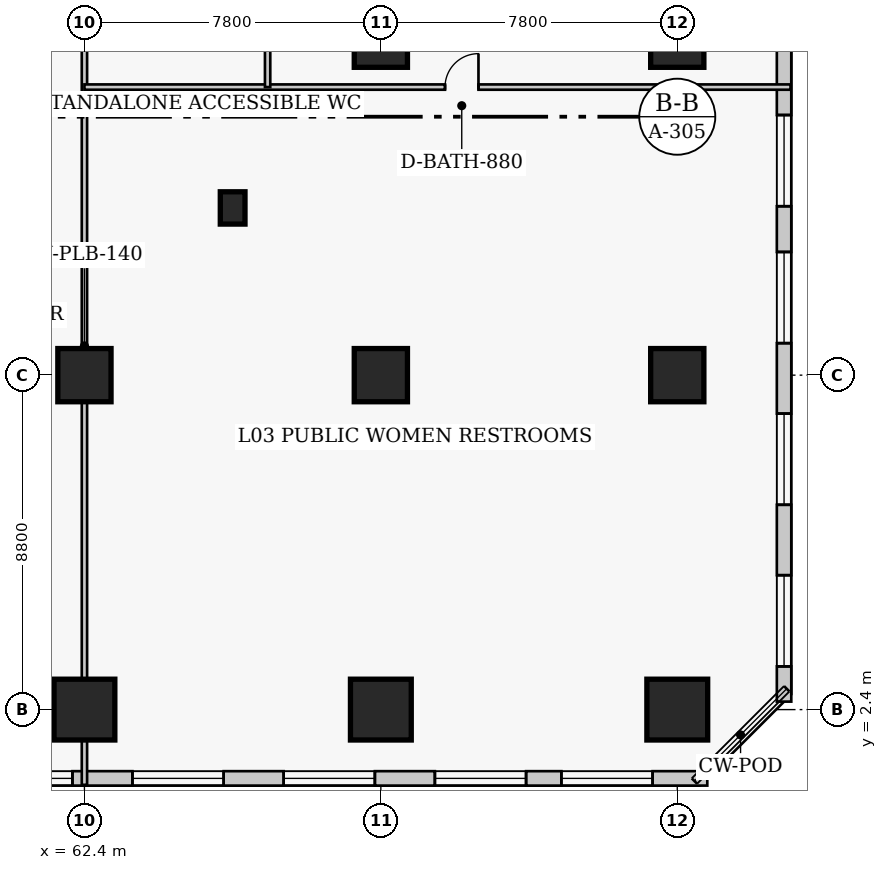
"""IFC4 building model, lengths in metres.
Left out: names, types, materials, properties, quantities, classifications, styles, units other than length and angle.
Written with IfcOpenShell. Run it as: python <this file> out.ifc"""

import sys

from ifc_helpers import new_model, si_unit, direction, frame, frame_2d, origin, origin_2d, place, context, subcontext, project, spatial, rectangle, extrude, element, fill, save


model = new_model("IFC4")
c1 = context("Model", 3, precision=1e-05, world=origin(), true_north=direction((0.0, 1.0)))
c2 = subcontext(c1, "Body", "Model", "MODEL_VIEW")
j1 = project(units=[si_unit("LENGTHUNIT", "METRE"), si_unit("PLANEANGLEUNIT", "RADIAN")], contexts=[c1])
p1 = place(None, origin())
s1 = spatial("IfcSite", under=j1, at=p1, CompositionType="ELEMENT")
p2 = place(p1, origin())
s2 = spatial("IfcBuilding", under=s1, at=p2, CompositionType="ELEMENT")
p3 = place(p2, frame((0.0, 0.0, 15.8)))
s3 = spatial("IfcBuildingStorey", under=s2, at=p3, CompositionType="ELEMENT", Elevation=15.8)
p4 = place(p3, frame((62.4, 2.4, 0.0), z_axis=(0.0, 0.0, 1.0), x_axis=(1.0, 0.0, 0.0)))
e1 = element("IfcColumn", 1, at=p4, inside=s3, PredefinedType="COLUMN", context=c2, shape_type="SweptSolid", body=[
    extrude(rectangle(XDim=1.6, YDim=1.6, at=origin_2d()), origin(), (0.0, 0.0, 1.0), 5.0),
])
p5 = place(p3, frame((62.4, 11.2, 0.0), z_axis=(0.0, 0.0, 1.0), x_axis=(1.0, 0.0, 0.0)))
e2 = element("IfcColumn", 2, at=p5, inside=s3, PredefinedType="COLUMN", context=c2, shape_type="SweptSolid", body=[
    extrude(rectangle(XDim=1.4, YDim=1.4, at=origin_2d()), origin(), (0.0, 0.0, 1.0), 5.0),
])
p6 = place(p3, frame((70.2, 2.4, 0.0), z_axis=(0.0, 0.0, 1.0), x_axis=(1.0, 0.0, 0.0)))
e3 = element("IfcColumn", 3, at=p6, inside=s3, PredefinedType="COLUMN", context=c2, shape_type="SweptSolid", body=[
    extrude(rectangle(XDim=1.6, YDim=1.6, at=origin_2d()), origin(), (0.0, 0.0, 1.0), 5.0),
])
for number, where, z_axis, x_axis in (
    (4, (70.2, 11.2, 0.0), (0.0, 0.0, 1.0), (1.0, 0.0, 0.0)),
    (5, (70.2, 20.0, 0.0), (0.0, 0.0, 1.0), (1.0, 0.0, 0.0)),
):
    element("IfcColumn", number, at=place(p3, frame(where, z_axis=z_axis, x_axis=x_axis)), inside=s3, PredefinedType="COLUMN", context=c2, shape_type="SweptSolid", body=[
        extrude(rectangle(XDim=1.4, YDim=1.4, at=origin_2d()), origin(), (0.0, 0.0, 1.0), 5.0),
    ])
p7 = place(p3, frame((78.0, 2.4, 0.0), z_axis=(0.0, 0.0, 1.0), x_axis=(1.0, 0.0, 0.0)))
e6 = element("IfcColumn", 6, at=p7, inside=s3, PredefinedType="COLUMN", context=c2, shape_type="SweptSolid", body=[
    extrude(rectangle(XDim=1.6, YDim=1.6, at=origin_2d()), origin(), (0.0, 0.0, 1.0), 5.0),
])
for number, where, z_axis, x_axis in (
    (7, (78.0, 11.2, 0.0), (0.0, 0.0, 1.0), (1.0, 0.0, 0.0)),
    (8, (78.0, 20.0, 0.0), (0.0, 0.0, 1.0), (1.0, 0.0, 0.0)),
):
    element("IfcColumn", number, at=place(p3, frame(where, z_axis=z_axis, x_axis=x_axis)), inside=s3, PredefinedType="COLUMN", context=c2, shape_type="SweptSolid", body=[
        extrude(rectangle(XDim=1.4, YDim=1.4, at=origin_2d()), origin(), (0.0, 0.0, 1.0), 5.0),
    ])
p8 = place(p3, frame((66.3, 15.6, 0.0), z_axis=(0.0, 0.0, 1.0), x_axis=(1.0, 0.0, 0.0)))
e9 = element("IfcColumn", 9, at=p8, inside=s3, PredefinedType="PILASTER", context=c2, shape_type="SweptSolid", body=[
    extrude(rectangle(XDim=0.65, YDim=0.85, at=origin_2d()), origin(), (0.0, 0.0, 1.0), 5.0),
])
p9 = place(p3, frame((-0.79, 0.59, 0.0), z_axis=(0.0, 0.0, 1.0), x_axis=(1.0, 0.0, 0.0)))
e10 = element("IfcWall", 10, at=p9, inside=s3, PredefinedType="SOLIDWALL", context=c2, shape_type="SweptSolid", body=[
    extrude(rectangle(XDim=79.58, YDim=0.38, at=frame_2d((39.79, 0.0))), origin(), (0.0, 0.0, 1.0), 4.58),
])
p10 = place(p9, frame((1.439, 0.0, 0.75)))
e11 = element("IfcOpeningElement", 11, at=p10, cuts=e10, PredefinedType="OPENING", context=c2, shape_type="SweptSolid", body=[
    extrude(rectangle(XDim=2.4, YDim=2.2, at=frame_2d((1.2, 1.1))), frame((0.0, 0.2, 0.0), z_axis=(0.0, -1.0, 0.0), x_axis=(1.0, 0.0, 0.0)), (0.0, 0.0, 1.0), 0.4),
])
p11 = place(p9, frame((4.769, 0.0, 0.75)))
e12 = element("IfcOpeningElement", 12, at=p11, cuts=e10, PredefinedType="OPENING", context=c2, shape_type="SweptSolid", body=[
    extrude(rectangle(XDim=2.4, YDim=2.2, at=frame_2d((1.2, 1.1))), frame((0.0, 0.2, 0.0), z_axis=(0.0, -1.0, 0.0), x_axis=(1.0, 0.0, 0.0)), (0.0, 0.0, 1.0), 0.4),
])
p12 = place(p9, frame((16.706, 0.0, 0.75)))
e13 = element("IfcOpeningElement", 13, at=p12, cuts=e10, PredefinedType="OPENING", context=c2, shape_type="SweptSolid", body=[
    extrude(rectangle(XDim=2.4, YDim=2.2, at=frame_2d((1.2, 1.1))), frame((0.0, 0.2, 0.0), z_axis=(0.0, -1.0, 0.0), x_axis=(1.0, 0.0, 0.0)), (0.0, 0.0, 1.0), 0.4),
])
p13 = place(p9, frame((20.685, 0.0, 0.75)))
e14 = element("IfcOpeningElement", 14, at=p13, cuts=e10, PredefinedType="OPENING", context=c2, shape_type="SweptSolid", body=[
    extrude(rectangle(XDim=2.4, YDim=2.2, at=frame_2d((1.2, 1.1))), frame((0.0, 0.2, 0.0), z_axis=(0.0, -1.0, 0.0), x_axis=(1.0, 0.0, 0.0)), (0.0, 0.0, 1.0), 0.4),
])
p14 = place(p9, frame((24.664, 0.0, 0.75)))
e15 = element("IfcOpeningElement", 15, at=p14, cuts=e10, PredefinedType="OPENING", context=c2, shape_type="SweptSolid", body=[
    extrude(rectangle(XDim=2.4, YDim=2.2, at=frame_2d((1.2, 1.1))), frame((0.0, 0.2, 0.0), z_axis=(0.0, -1.0, 0.0), x_axis=(1.0, 0.0, 0.0)), (0.0, 0.0, 1.0), 0.4),
])
p15 = place(p9, frame((28.643, 0.0, 0.75)))
e16 = element("IfcOpeningElement", 16, at=p15, cuts=e10, PredefinedType="OPENING", context=c2, shape_type="SweptSolid", body=[
    extrude(rectangle(XDim=2.4, YDim=2.2, at=frame_2d((1.2, 1.1))), frame((0.0, 0.2, 0.0), z_axis=(0.0, -1.0, 0.0), x_axis=(1.0, 0.0, 0.0)), (0.0, 0.0, 1.0), 0.4),
])
p16 = place(p9, frame((32.622, 0.0, 0.75)))
e17 = element("IfcOpeningElement", 17, at=p16, cuts=e10, PredefinedType="OPENING", context=c2, shape_type="SweptSolid", body=[
    extrude(rectangle(XDim=2.4, YDim=2.2, at=frame_2d((1.2, 1.1))), frame((0.0, 0.2, 0.0), z_axis=(0.0, -1.0, 0.0), x_axis=(1.0, 0.0, 0.0)), (0.0, 0.0, 1.0), 0.4),
])
p17 = place(p9, frame((37.75, 0.0, 0.75)))
e18 = element("IfcOpeningElement", 18, at=p17, cuts=e10, PredefinedType="OPENING", context=c2, shape_type="SweptSolid", body=[
    extrude(rectangle(XDim=2.4, YDim=2.2, at=frame_2d((1.2, 1.1))), frame((0.0, 0.2, 0.0), z_axis=(0.0, -1.0, 0.0), x_axis=(1.0, 0.0, 0.0)), (0.0, 0.0, 1.0), 0.4),
])
p18 = place(p9, frame((44.559, 0.0, 0.75)))
e19 = element("IfcOpeningElement", 19, at=p18, cuts=e10, PredefinedType="OPENING", context=c2, shape_type="SweptSolid", body=[
    extrude(rectangle(XDim=2.4, YDim=2.2, at=frame_2d((1.2, 1.1))), frame((0.0, 0.2, 0.0), z_axis=(0.0, -1.0, 0.0), x_axis=(1.0, 0.0, 0.0)), (0.0, 0.0, 1.0), 0.4),
])
p19 = place(p9, frame((48.538, 0.0, 0.75)))
e20 = element("IfcOpeningElement", 20, at=p19, cuts=e10, PredefinedType="OPENING", context=c2, shape_type="SweptSolid", body=[
    extrude(rectangle(XDim=2.4, YDim=2.2, at=frame_2d((1.2, 1.1))), frame((0.0, 0.2, 0.0), z_axis=(0.0, -1.0, 0.0), x_axis=(1.0, 0.0, 0.0)), (0.0, 0.0, 1.0), 0.4),
])
p20 = place(p9, frame((56.496, 0.0, 0.75)))
e21 = element("IfcOpeningElement", 21, at=p20, cuts=e10, PredefinedType="OPENING", context=c2, shape_type="SweptSolid", body=[
    extrude(rectangle(XDim=2.4, YDim=2.2, at=frame_2d((1.2, 1.1))), frame((0.0, 0.2, 0.0), z_axis=(0.0, -1.0, 0.0), x_axis=(1.0, 0.0, 0.0)), (0.0, 0.0, 1.0), 0.4),
])
p21 = place(p9, frame((60.475, 0.0, 0.75)))
e22 = element("IfcOpeningElement", 22, at=p21, cuts=e10, PredefinedType="OPENING", context=c2, shape_type="SweptSolid", body=[
    extrude(rectangle(XDim=2.4, YDim=2.2, at=frame_2d((1.2, 1.1))), frame((0.0, 0.2, 0.0), z_axis=(0.0, -1.0, 0.0), x_axis=(1.0, 0.0, 0.0)), (0.0, 0.0, 1.0), 0.4),
])
p22 = place(p9, frame((64.454, 0.0, 0.75)))
e23 = element("IfcOpeningElement", 23, at=p22, cuts=e10, PredefinedType="OPENING", context=c2, shape_type="SweptSolid", body=[
    extrude(rectangle(XDim=2.4, YDim=2.2, at=frame_2d((1.2, 1.1))), frame((0.0, 0.2, 0.0), z_axis=(0.0, -1.0, 0.0), x_axis=(1.0, 0.0, 0.0)), (0.0, 0.0, 1.0), 0.4),
])
p23 = place(p9, frame((68.433, 0.0, 0.75)))
e24 = element("IfcOpeningElement", 24, at=p23, cuts=e10, PredefinedType="OPENING", context=c2, shape_type="SweptSolid", body=[
    extrude(rectangle(XDim=2.4, YDim=2.2, at=frame_2d((1.2, 1.1))), frame((0.0, 0.2, 0.0), z_axis=(0.0, -1.0, 0.0), x_axis=(1.0, 0.0, 0.0)), (0.0, 0.0, 1.0), 0.4),
])
p24 = place(p9, frame((72.412, 0.0, 0.75)))
e25 = element("IfcOpeningElement", 25, at=p24, cuts=e10, PredefinedType="OPENING", context=c2, shape_type="SweptSolid", body=[
    extrude(rectangle(XDim=2.4, YDim=2.2, at=frame_2d((1.2, 1.1))), frame((0.0, 0.2, 0.0), z_axis=(0.0, -1.0, 0.0), x_axis=(1.0, 0.0, 0.0)), (0.0, 0.0, 1.0), 0.4),
])
p25 = place(p9, frame((75.74, 0.0, 0.75)))
e26 = element("IfcOpeningElement", 26, at=p25, cuts=e10, PredefinedType="OPENING", context=c2, shape_type="SweptSolid", body=[
    extrude(rectangle(XDim=2.4, YDim=2.2, at=frame_2d((1.2, 1.1))), frame((0.0, 0.2, 0.0), z_axis=(0.0, -1.0, 0.0), x_axis=(1.0, 0.0, 0.0)), (0.0, 0.0, 1.0), 0.4),
])
p26 = place(p3, frame((80.81, 2.61, 0.0), z_axis=(0.0, 0.0, 1.0), x_axis=(0.0, 1.0, 0.0)))
e27 = element("IfcWall", 27, at=p26, inside=s3, PredefinedType="SOLIDWALL", context=c2, shape_type="SweptSolid", body=[
    extrude(rectangle(XDim=46.78, YDim=0.38, at=frame_2d((23.39, 0.0))), origin(), (0.0, 0.0, 1.0), 4.58),
])
p27 = place(p26, frame((0.927, 0.0, 0.75)))
e28 = element("IfcOpeningElement", 28, at=p27, cuts=e27, PredefinedType="OPENING", context=c2, shape_type="SweptSolid", body=[
    extrude(rectangle(XDim=2.4, YDim=2.2, at=frame_2d((1.2, 1.1))), frame((0.0, 0.2, 0.0), z_axis=(0.0, -1.0, 0.0), x_axis=(1.0, 0.0, 0.0)), (0.0, 0.0, 1.0), 0.4),
])
p28 = place(p26, frame((5.179, 0.0, 0.75)))
e29 = element("IfcOpeningElement", 29, at=p28, cuts=e27, PredefinedType="OPENING", context=c2, shape_type="SweptSolid", body=[
    extrude(rectangle(XDim=2.4, YDim=2.2, at=frame_2d((1.2, 1.1))), frame((0.0, 0.2, 0.0), z_axis=(0.0, -1.0, 0.0), x_axis=(1.0, 0.0, 0.0)), (0.0, 0.0, 1.0), 0.4),
])
p29 = place(p26, frame((9.432, 0.0, 0.75)))
e30 = element("IfcOpeningElement", 30, at=p29, cuts=e27, PredefinedType="OPENING", context=c2, shape_type="SweptSolid", body=[
    extrude(rectangle(XDim=2.4, YDim=2.2, at=frame_2d((1.2, 1.1))), frame((0.0, 0.2, 0.0), z_axis=(0.0, -1.0, 0.0), x_axis=(1.0, 0.0, 0.0)), (0.0, 0.0, 1.0), 0.4),
])
p30 = place(p26, frame((13.034, 0.0, 0.75)))
e31 = element("IfcOpeningElement", 31, at=p30, cuts=e27, PredefinedType="OPENING", context=c2, shape_type="SweptSolid", body=[
    extrude(rectangle(XDim=2.4, YDim=2.2, at=frame_2d((1.2, 1.1))), frame((0.0, 0.2, 0.0), z_axis=(0.0, -1.0, 0.0), x_axis=(1.0, 0.0, 0.0)), (0.0, 0.0, 1.0), 0.4),
])
p31 = place(p26, frame((17.937, 0.0, 0.75)))
e32 = element("IfcOpeningElement", 32, at=p31, cuts=e27, PredefinedType="OPENING", context=c2, shape_type="SweptSolid", body=[
    extrude(rectangle(XDim=2.4, YDim=2.2, at=frame_2d((1.2, 1.1))), frame((0.0, 0.2, 0.0), z_axis=(0.0, -1.0, 0.0), x_axis=(1.0, 0.0, 0.0)), (0.0, 0.0, 1.0), 0.4),
])
p32 = place(p26, frame((26.443, 0.0, 0.75)))
e33 = element("IfcOpeningElement", 33, at=p32, cuts=e27, PredefinedType="OPENING", context=c2, shape_type="SweptSolid", body=[
    extrude(rectangle(XDim=2.4, YDim=2.2, at=frame_2d((1.2, 1.1))), frame((0.0, 0.2, 0.0), z_axis=(0.0, -1.0, 0.0), x_axis=(1.0, 0.0, 0.0)), (0.0, 0.0, 1.0), 0.4),
])
p33 = place(p26, frame((30.696, 0.0, 0.75)))
e34 = element("IfcOpeningElement", 34, at=p33, cuts=e27, PredefinedType="OPENING", context=c2, shape_type="SweptSolid", body=[
    extrude(rectangle(XDim=2.4, YDim=2.2, at=frame_2d((1.2, 1.1))), frame((0.0, 0.2, 0.0), z_axis=(0.0, -1.0, 0.0), x_axis=(1.0, 0.0, 0.0)), (0.0, 0.0, 1.0), 0.4),
])
p34 = place(p26, frame((34.948, 0.0, 0.75)))
e35 = element("IfcOpeningElement", 35, at=p34, cuts=e27, PredefinedType="OPENING", context=c2, shape_type="SweptSolid", body=[
    extrude(rectangle(XDim=2.4, YDim=2.2, at=frame_2d((1.2, 1.1))), frame((0.0, 0.2, 0.0), z_axis=(0.0, -1.0, 0.0), x_axis=(1.0, 0.0, 0.0)), (0.0, 0.0, 1.0), 0.4),
])
p35 = place(p26, frame((39.201, 0.0, 0.75)))
e36 = element("IfcOpeningElement", 36, at=p35, cuts=e27, PredefinedType="OPENING", context=c2, shape_type="SweptSolid", body=[
    extrude(rectangle(XDim=2.4, YDim=2.2, at=frame_2d((1.2, 1.1))), frame((0.0, 0.2, 0.0), z_axis=(0.0, -1.0, 0.0), x_axis=(1.0, 0.0, 0.0)), (0.0, 0.0, 1.0), 0.4),
])
p36 = place(p26, frame((43.454, 0.0, 0.75)))
e37 = element("IfcOpeningElement", 37, at=p36, cuts=e27, PredefinedType="OPENING", context=c2, shape_type="SweptSolid", body=[
    extrude(rectangle(XDim=2.4, YDim=2.2, at=frame_2d((1.2, 1.1))), frame((0.0, 0.2, 0.0), z_axis=(0.0, -1.0, 0.0), x_axis=(1.0, 0.0, 0.0)), (0.0, 0.0, 1.0), 0.4),
])
p37 = place(p3, frame((62.4, 0.42, 0.0), z_axis=(0.0, 0.0, 1.0), x_axis=(0.0, 1.0, 0.0)))
e38 = element("IfcWall", 38, at=p37, inside=s3, PredefinedType="PLUMBINGWALL", context=c2, shape_type="SweptSolid", body=[
    extrude(rectangle(XDim=23.1, YDim=0.14, at=frame_2d((11.55, 0.0))), origin(), (0.0, 0.0, 1.0), 3.83),
])
p38 = place(p3, frame((62.4, 18.78, 0.0), z_axis=(0.0, 0.0, 1.0), x_axis=(1.0, 0.0, 0.0)))
e39 = element("IfcWall", 39, at=p38, inside=s3, PredefinedType="PLUMBINGWALL", context=c2, shape_type="SweptSolid", body=[
    extrude(rectangle(XDim=18.58, YDim=0.14, at=frame_2d((9.29, 0.0))), origin(), (0.0, 0.0, 1.0), 4.58),
])
p39 = place(p38, frame((9.489, 0.0, 0.0)))
e40 = element("IfcOpeningElement", 40, at=p39, cuts=e39, PredefinedType="OPENING", context=c2, shape_type="SweptSolid", body=[
    extrude(rectangle(XDim=0.88, YDim=2.05, at=frame_2d((0.44, 1.025))), frame((0.0, 0.08, 0.0), z_axis=(0.0, -1.0, 0.0), x_axis=(1.0, 0.0, 0.0)), (0.0, 0.0, 1.0), 0.16),
])
p40 = place(p3, frame((67.22, 18.78, 0.0), z_axis=(0.0, 0.0, 1.0), x_axis=(0.0, 1.0, 0.0)))
e41 = element("IfcWall", 41, at=p40, inside=s3, PredefinedType="PLUMBINGWALL", context=c2, shape_type="SweptSolid", body=[
    extrude(rectangle(XDim=4.74, YDim=0.14, at=frame_2d((2.37, 0.0))), origin(), (0.0, 0.0, 1.0), 4.58),
])
p41 = place(p21, origin())
e42 = element("IfcWindow", 42, at=p41, inside=s3, PartitioningType="SINGLE_PANEL", PredefinedType="WINDOW", context=c2, shape_type="SweptSolid", body=[
    extrude(rectangle(XDim=2.4, YDim=2.2, at=frame_2d((1.2, 1.1))), frame((0.0, 0.03, 0.0), z_axis=(0.0, -1.0, 0.0), x_axis=(1.0, 0.0, 0.0)), (0.0, 0.0, 1.0), 0.06),
])
fill(e22, e42)
p42 = place(p22, origin())
e43 = element("IfcWindow", 43, at=p42, inside=s3, PartitioningType="SINGLE_PANEL", PredefinedType="WINDOW", context=c2, shape_type="SweptSolid", body=[
    extrude(rectangle(XDim=2.4, YDim=2.2, at=frame_2d((1.2, 1.1))), frame((0.0, 0.03, 0.0), z_axis=(0.0, -1.0, 0.0), x_axis=(1.0, 0.0, 0.0)), (0.0, 0.0, 1.0), 0.06),
])
fill(e23, e43)
p43 = place(p23, origin())
e44 = element("IfcWindow", 44, at=p43, inside=s3, PartitioningType="SINGLE_PANEL", PredefinedType="WINDOW", context=c2, shape_type="SweptSolid", body=[
    extrude(rectangle(XDim=2.4, YDim=2.2, at=frame_2d((1.2, 1.1))), frame((0.0, 0.03, 0.0), z_axis=(0.0, -1.0, 0.0), x_axis=(1.0, 0.0, 0.0)), (0.0, 0.0, 1.0), 0.06),
])
fill(e24, e44)
p44 = place(p24, origin())
e45 = element("IfcWindow", 45, at=p44, inside=s3, PartitioningType="SINGLE_PANEL", PredefinedType="WINDOW", context=c2, shape_type="SweptSolid", body=[
    extrude(rectangle(XDim=2.4, YDim=2.2, at=frame_2d((1.2, 1.1))), frame((0.0, 0.03, 0.0), z_axis=(0.0, -1.0, 0.0), x_axis=(1.0, 0.0, 0.0)), (0.0, 0.0, 1.0), 0.06),
])
fill(e25, e45)
p45 = place(p25, origin())
e46 = element("IfcWindow", 46, at=p45, inside=s3, PartitioningType="SINGLE_PANEL", PredefinedType="WINDOW", context=c2, shape_type="SweptSolid", body=[
    extrude(rectangle(XDim=2.4, YDim=2.2, at=frame_2d((1.2, 1.1))), frame((0.0, 0.03, 0.0), z_axis=(0.0, -1.0, 0.0), x_axis=(1.0, 0.0, 0.0)), (0.0, 0.0, 1.0), 0.06),
])
fill(e26, e46)
p46 = place(p27, origin())
e47 = element("IfcWindow", 47, at=p46, inside=s3, PartitioningType="SINGLE_PANEL", PredefinedType="WINDOW", context=c2, shape_type="SweptSolid", body=[
    extrude(rectangle(XDim=2.4, YDim=2.2, at=frame_2d((1.2, 1.1))), frame((0.0, 0.03, 0.0), z_axis=(0.0, -1.0, 0.0), x_axis=(1.0, 0.0, 0.0)), (0.0, 0.0, 1.0), 0.06),
])
fill(e28, e47)
p47 = place(p28, origin())
e48 = element("IfcWindow", 48, at=p47, inside=s3, PartitioningType="SINGLE_PANEL", PredefinedType="WINDOW", context=c2, shape_type="SweptSolid", body=[
    extrude(rectangle(XDim=2.4, YDim=2.2, at=frame_2d((1.2, 1.1))), frame((0.0, 0.03, 0.0), z_axis=(0.0, -1.0, 0.0), x_axis=(1.0, 0.0, 0.0)), (0.0, 0.0, 1.0), 0.06),
])
fill(e29, e48)
p48 = place(p29, origin())
e49 = element("IfcWindow", 49, at=p48, inside=s3, PartitioningType="SINGLE_PANEL", PredefinedType="WINDOW", context=c2, shape_type="SweptSolid", body=[
    extrude(rectangle(XDim=2.4, YDim=2.2, at=frame_2d((1.2, 1.1))), frame((0.0, 0.03, 0.0), z_axis=(0.0, -1.0, 0.0), x_axis=(1.0, 0.0, 0.0)), (0.0, 0.0, 1.0), 0.06),
])
fill(e30, e49)
p49 = place(p30, origin())
e50 = element("IfcWindow", 50, at=p49, inside=s3, PartitioningType="SINGLE_PANEL", PredefinedType="WINDOW", context=c2, shape_type="SweptSolid", body=[
    extrude(rectangle(XDim=2.4, YDim=2.2, at=frame_2d((1.2, 1.1))), frame((0.0, 0.03, 0.0), z_axis=(0.0, -1.0, 0.0), x_axis=(1.0, 0.0, 0.0)), (0.0, 0.0, 1.0), 0.06),
])
fill(e31, e50)
p50 = place(p39, origin())
e51 = element("IfcDoor", 51, at=p50, inside=s3, OperationType="SINGLE_SWING_RIGHT", PredefinedType="DOOR", context=c2, shape_type="SweptSolid", body=[
    extrude(rectangle(XDim=0.88, YDim=2.05, at=frame_2d((0.44, 1.025))), frame((0.0, 0.025, 0.0), z_axis=(0.0, -1.0, 0.0), x_axis=(1.0, 0.0, 0.0)), (0.0, 0.0, 1.0), 0.05),
])
fill(e40, e51)
save(model, sys.argv[1])
